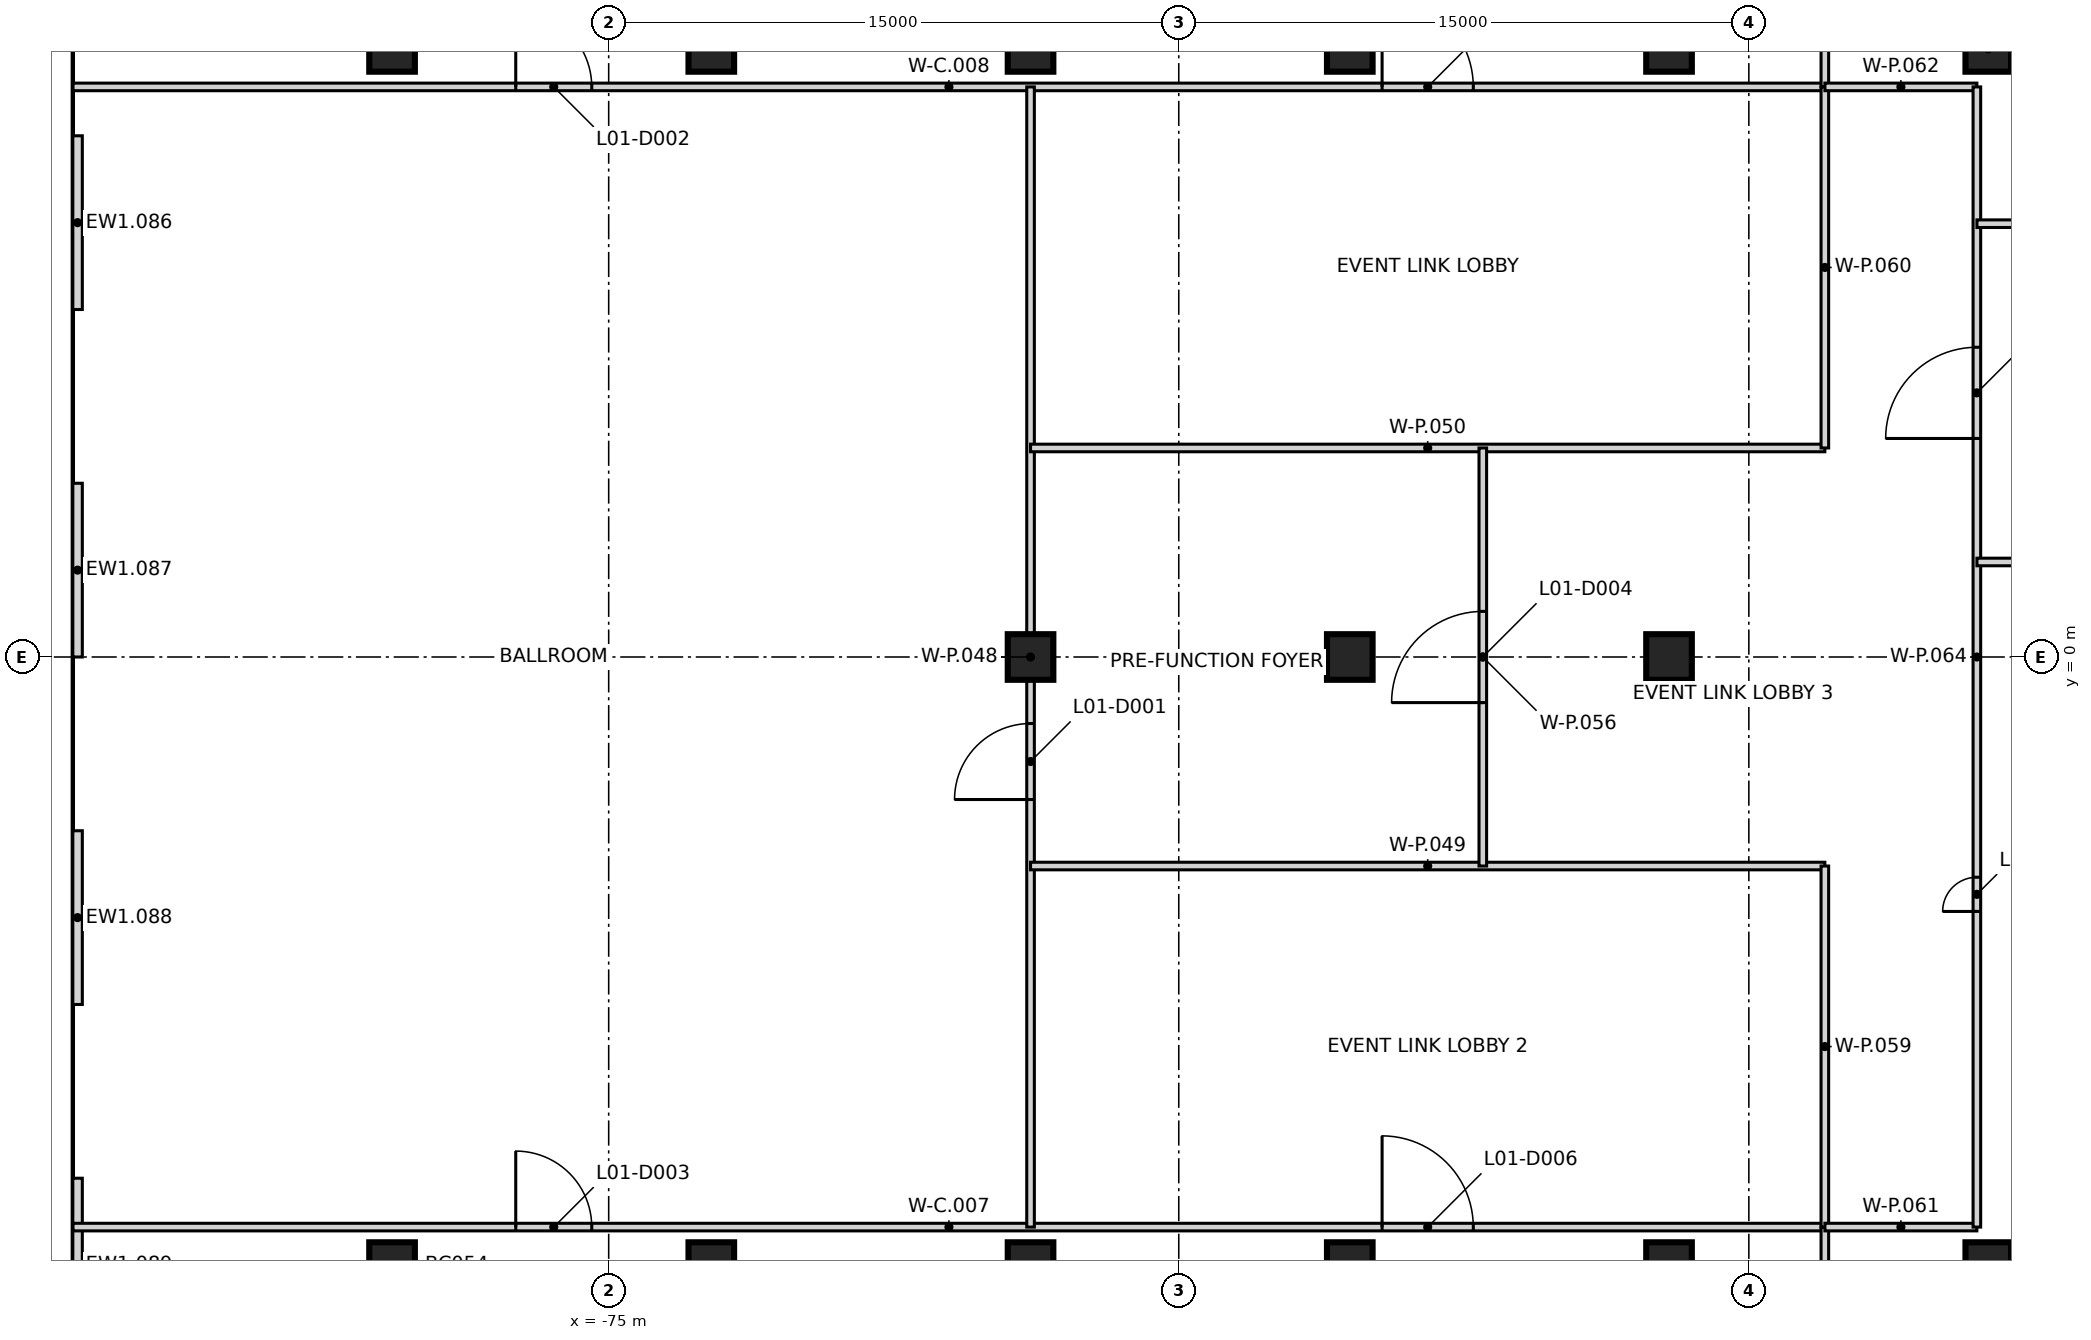
"""IFC4 building model, lengths in metres.
Left out: names, types, materials, properties, quantities, classifications, styles, units other than length and angle.
Written with IfcOpenShell. Run it as: python <this file> out.ifc"""

import sys

from ifc_helpers import new_model, si_unit, direction, frame, frame_2d, origin, origin_2d, place, context, subcontext, project, spatial, rectangle, extrude, element, fill, save


model = new_model("IFC4")
c1 = context("Model", 3, precision=1e-05, world=origin(), true_north=direction((0.0, 1.0)))
c2 = subcontext(c1, "Body", "Model", "MODEL_VIEW")
j1 = project(units=[si_unit("LENGTHUNIT", "METRE"), si_unit("PLANEANGLEUNIT", "RADIAN")], contexts=[c1])
p1 = place(None, origin())
s1 = spatial("IfcSite", under=j1, at=p1, CompositionType="ELEMENT")
p2 = place(p1, origin())
s2 = spatial("IfcBuilding", under=s1, at=p2, CompositionType="ELEMENT")
p3 = place(p2, frame((0.0, 0.0, 7.5)))
s3 = spatial("IfcBuildingStorey", under=s2, at=p3, CompositionType="ELEMENT", Elevation=7.5)
for number, where, z_axis, x_axis in (
    (1, (-80.7, -16.0, -0.4), (0.0, 0.0, 1.0), (1.0, 0.0, 0.0)),
    (2, (-80.7, 16.0, -0.4), (0.0, 0.0, 1.0), (1.0, 0.0, 0.0)),
    (3, (-72.3, -16.0, -0.4), (0.0, 0.0, 1.0), (1.0, 0.0, 0.0)),
    (4, (-72.3, 16.0, -0.4), (0.0, 0.0, 1.0), (1.0, 0.0, 0.0)),
    (5, (-63.9, -16.0, -0.4), (0.0, 0.0, 1.0), (1.0, 0.0, 0.0)),
    (6, (-63.9, 0.0, -0.4), (0.0, 0.0, 1.0), (1.0, 0.0, 0.0)),
    (7, (-63.9, 16.0, -0.4), (0.0, 0.0, 1.0), (1.0, 0.0, 0.0)),
    (8, (-55.5, -16.0, -0.4), (0.0, 0.0, 1.0), (1.0, 0.0, 0.0)),
    (9, (-55.5, 0.0, -0.4), (0.0, 0.0, 1.0), (1.0, 0.0, 0.0)),
    (10, (-55.5, 16.0, -0.4), (0.0, 0.0, 1.0), (1.0, 0.0, 0.0)),
    (11, (-47.1, -16.0, -0.4), (0.0, 0.0, 1.0), (1.0, 0.0, 0.0)),
    (12, (-47.1, 0.0, -0.4), (0.0, 0.0, 1.0), (1.0, 0.0, 0.0)),
    (13, (-47.1, 16.0, -0.4), (0.0, 0.0, 1.0), (1.0, 0.0, 0.0)),
    (14, (-38.7, -16.0, -0.4), (0.0, 0.0, 1.0), (1.0, 0.0, 0.0)),
    (15, (-38.7, 16.0, -0.4), (0.0, 0.0, 1.0), (1.0, 0.0, 0.0)),
):
    element("IfcColumn", number, at=place(p3, frame(where, z_axis=z_axis, x_axis=x_axis)), inside=s3, PredefinedType="COLUMN", context=c2, shape_type="SweptSolid", body=[
        extrude(rectangle(XDim=1.2, YDim=1.2, at=origin_2d()), origin(), (0.0, 0.0, 1.0), 6.55),
    ])
for number, where, z_axis, x_axis in (
    (16, (-88.975, 9.143, 0.0), (0.0, 0.0, 1.0), (0.0, 1.0, 0.0)),
    (17, (-88.975, 0.0, 0.0), (0.0, 0.0, 1.0), (0.0, 1.0, 0.0)),
):
    element("IfcWall", number, at=place(p3, frame(where, z_axis=z_axis, x_axis=x_axis)), inside=s3, PredefinedType="SOLIDWALL", context=c2, shape_type="SweptSolid", body=[
        extrude(rectangle(XDim=4.572, YDim=0.25, at=frame_2d((2.286, 0.0))), origin(), (0.0, 0.0, 1.0), 6.15),
    ])
for number, where, z_axis, x_axis in (
    (18, (-88.975, -9.143, 0.0), (0.0, 0.0, 1.0), (0.0, 1.0, 0.0)),
    (19, (-88.975, -18.286, 0.0), (0.0, 0.0, 1.0), (0.0, 1.0, 0.0)),
):
    element("IfcWall", number, at=place(p3, frame(where, z_axis=z_axis, x_axis=x_axis)), inside=s3, PredefinedType="SOLIDWALL", context=c2, shape_type="SweptSolid", body=[
        extrude(rectangle(XDim=4.571, YDim=0.25, at=frame_2d((2.286, 0.0))), origin(), (0.0, 0.0, 1.0), 6.15),
    ])
p4 = place(p3, frame((-89.095, -15.0, 0.0), z_axis=(0.0, 0.0, 1.0), x_axis=(1.0, 0.0, 0.0)))
e20 = element("IfcWall", 20, at=p4, inside=s3, PredefinedType="PARTITIONING", context=c2, shape_type="SweptSolid", body=[
    extrude(rectangle(XDim=46.095, YDim=0.2, at=frame_2d((23.047, 0.0))), origin(), (0.0, 0.0, 1.0), 6.15),
])
p5 = place(p4, frame((11.649, 0.0, 0.0)))
e21 = element("IfcOpeningElement", 21, at=p5, cuts=e20, PredefinedType="OPENING", context=c2, shape_type="SweptSolid", body=[
    extrude(rectangle(XDim=2.0, YDim=2.1, at=frame_2d((1.0, 1.05))), frame((0.0, 0.11, 0.0), z_axis=(0.0, -1.0, 0.0), x_axis=(1.0, 0.0, 0.0)), (0.0, 0.0, 1.0), 0.22),
])
p6 = place(p4, frame((34.445, 0.0, 0.0)))
e22 = element("IfcOpeningElement", 22, at=p6, cuts=e20, PredefinedType="OPENING", context=c2, shape_type="SweptSolid", body=[
    extrude(rectangle(XDim=2.4, YDim=2.1, at=frame_2d((1.2, 1.05))), frame((0.0, 0.11, 0.0), z_axis=(0.0, -1.0, 0.0), x_axis=(1.0, 0.0, 0.0)), (0.0, 0.0, 1.0), 0.22),
])
p7 = place(p3, frame((-89.095, 15.0, 0.0), z_axis=(0.0, 0.0, 1.0), x_axis=(1.0, 0.0, 0.0)))
e23 = element("IfcWall", 23, at=p7, inside=s3, PredefinedType="PARTITIONING", context=c2, shape_type="SweptSolid", body=[
    extrude(rectangle(XDim=46.095, YDim=0.2, at=frame_2d((23.047, 0.0))), origin(), (0.0, 0.0, 1.0), 6.15),
])
p8 = place(p7, frame((11.649, 0.0, 0.0)))
e24 = element("IfcOpeningElement", 24, at=p8, cuts=e23, PredefinedType="OPENING", context=c2, shape_type="SweptSolid", body=[
    extrude(rectangle(XDim=2.0, YDim=2.1, at=frame_2d((1.0, 1.05))), frame((0.0, 0.11, 0.0), z_axis=(0.0, -1.0, 0.0), x_axis=(1.0, 0.0, 0.0)), (0.0, 0.0, 1.0), 0.22),
])
p9 = place(p7, frame((34.445, 0.0, 0.0)))
e25 = element("IfcOpeningElement", 25, at=p9, cuts=e23, PredefinedType="OPENING", context=c2, shape_type="SweptSolid", body=[
    extrude(rectangle(XDim=2.4, YDim=2.1, at=frame_2d((1.2, 1.05))), frame((0.0, 0.11, 0.0), z_axis=(0.0, -1.0, 0.0), x_axis=(1.0, 0.0, 0.0)), (0.0, 0.0, 1.0), 0.22),
])
for number, where, z_axis, x_axis in (
    (26, (-43.0, -19.5, 0.0), (0.0, 0.0, 1.0), (0.0, 1.0, 0.0)),
    (27, (-43.0, 15.002, 0.0), (0.0, 0.0, 1.0), (0.0, 1.0, 0.0)),
):
    element("IfcWall", number, at=place(p3, frame(where, z_axis=z_axis, x_axis=x_axis)), inside=s3, PredefinedType="PARTITIONING", context=c2, shape_type="SweptSolid", body=[
        extrude(rectangle(XDim=4.498, YDim=0.2, at=frame_2d((2.249, 0.0))), origin(), (0.0, 0.0, 1.0), 6.15),
    ])
p10 = place(p3, frame((-63.9, -15.0, 0.0), z_axis=(0.0, 0.0, 1.0), x_axis=(0.0, 1.0, 0.0)))
e28 = element("IfcWall", 28, at=p10, inside=s3, PredefinedType="PARTITIONING", context=c2, shape_type="SweptSolid", body=[
    extrude(rectangle(XDim=30.0, YDim=0.2, at=frame_2d((15.0, 0.0))), origin(), (0.0, 0.0, 1.0), 6.15),
])
p11 = place(p10, frame((11.25, 0.0, 0.0)))
e29 = element("IfcOpeningElement", 29, at=p11, cuts=e28, PredefinedType="OPENING", context=c2, shape_type="SweptSolid", body=[
    extrude(rectangle(XDim=2.0, YDim=2.1, at=frame_2d((1.0, 1.05))), frame((0.0, 0.11, 0.0), z_axis=(0.0, -1.0, 0.0), x_axis=(1.0, 0.0, 0.0)), (0.0, 0.0, 1.0), 0.22),
])
for number, where, z_axis, x_axis in (
    (30, (-63.9, -5.5, 0.0), (0.0, 0.0, 1.0), (1.0, 0.0, 0.0)),
    (31, (-63.9, 5.5, 0.0), (0.0, 0.0, 1.0), (1.0, 0.0, 0.0)),
):
    element("IfcWall", number, at=place(p3, frame(where, z_axis=z_axis, x_axis=x_axis)), inside=s3, PredefinedType="PARTITIONING", context=c2, shape_type="SweptSolid", body=[
        extrude(rectangle(XDim=20.9, YDim=0.2, at=frame_2d((10.45, 0.0))), origin(), (0.0, 0.0, 1.0), 6.15),
    ])
p12 = place(p3, frame((-52.0, -5.5, 0.0), z_axis=(0.0, 0.0, 1.0), x_axis=(0.0, 1.0, 0.0)))
e32 = element("IfcWall", 32, at=p12, inside=s3, PredefinedType="PARTITIONING", context=c2, shape_type="SweptSolid", body=[
    extrude(rectangle(XDim=11.0, YDim=0.2, at=frame_2d((5.5, 0.0))), origin(), (0.0, 0.0, 1.0), 6.15),
])
p13 = place(p12, frame((4.3, 0.0, 0.0)))
e33 = element("IfcOpeningElement", 33, at=p13, cuts=e32, PredefinedType="OPENING", context=c2, shape_type="SweptSolid", body=[
    extrude(rectangle(XDim=2.4, YDim=2.1, at=frame_2d((1.2, 1.05))), frame((0.0, 0.11, 0.0), z_axis=(0.0, -1.0, 0.0), x_axis=(1.0, 0.0, 0.0)), (0.0, 0.0, 1.0), 0.22),
])
for number, where, z_axis, x_axis in (
    (34, (-43.0, -15.0, 0.0), (0.0, 0.0, 1.0), (0.0, 1.0, 0.0)),
    (35, (-43.0, 5.5, 0.0), (0.0, 0.0, 1.0), (0.0, 1.0, 0.0)),
):
    element("IfcWall", number, at=place(p3, frame(where, z_axis=z_axis, x_axis=x_axis)), inside=s3, PredefinedType="PARTITIONING", context=c2, shape_type="SweptSolid", body=[
        extrude(rectangle(XDim=9.5, YDim=0.2, at=frame_2d((4.75, 0.0))), origin(), (0.0, 0.0, 1.0), 6.15),
    ])
for number, where, z_axis, x_axis in (
    (36, (-42.998, -15.0, 0.0), (0.0, 0.0, 1.0), (1.0, 0.0, 0.0)),
    (37, (-42.998, 15.0, 0.0), (0.0, 0.0, 1.0), (1.0, 0.0, 0.0)),
):
    element("IfcWall", number, at=place(p3, frame(where, z_axis=z_axis, x_axis=x_axis)), inside=s3, PredefinedType="PARTITIONING", context=c2, shape_type="SweptSolid", body=[
        extrude(rectangle(XDim=3.998, YDim=0.2, at=frame_2d((1.999, 0.0))), origin(), (0.0, 0.0, 1.0), 6.15),
    ])
p14 = place(p3, frame((-39.0, -15.0, 0.0), z_axis=(0.0, 0.0, 1.0), x_axis=(0.0, 1.0, 0.0)))
e38 = element("IfcWall", 38, at=p14, inside=s3, PredefinedType="PARTITIONING", context=c2, shape_type="SweptSolid", body=[
    extrude(rectangle(XDim=30.0, YDim=0.2, at=frame_2d((15.0, 0.0))), origin(), (0.0, 0.0, 1.0), 6.15),
])
p15 = place(p14, frame((20.75, 0.0, 0.0)))
e39 = element("IfcOpeningElement", 39, at=p15, cuts=e38, PredefinedType="OPENING", context=c2, shape_type="SweptSolid", body=[
    extrude(rectangle(XDim=2.4, YDim=2.1, at=frame_2d((1.2, 1.05))), frame((0.0, 0.11, 0.0), z_axis=(0.0, -1.0, 0.0), x_axis=(1.0, 0.0, 0.0)), (0.0, 0.0, 1.0), 0.22),
])
p16 = place(p14, frame((8.305, 0.0, 0.0)))
e40 = element("IfcOpeningElement", 40, at=p16, cuts=e38, PredefinedType="OPENING", context=c2, shape_type="SweptSolid", body=[
    extrude(rectangle(XDim=0.9, YDim=2.1, at=frame_2d((0.45, 1.05))), frame((0.0, 0.11, 0.0), z_axis=(0.0, -1.0, 0.0), x_axis=(1.0, 0.0, 0.0)), (0.0, 0.0, 1.0), 0.22),
])
p17 = place(p3, frame((-38.998, 2.5, 0.0), z_axis=(0.0, 0.0, 1.0), x_axis=(1.0, 0.0, 0.0)))
e41 = element("IfcWall", 41, at=p17, inside=s3, PredefinedType="PARTITIONING", context=c2, shape_type="SweptSolid", body=[
    extrude(rectangle(XDim=13.298, YDim=0.2, at=frame_2d((6.649, 0.0))), origin(), (0.0, 0.0, 1.0), 6.15),
])
p18 = place(p3, frame((-38.998, 11.401, 0.0), z_axis=(0.0, 0.0, 1.0), x_axis=(1.0, 0.0, 0.0)))
e42 = element("IfcWall", 42, at=p18, inside=s3, PredefinedType="PARTITIONING", context=c2, shape_type="SweptSolid", body=[
    extrude(rectangle(XDim=29.998, YDim=0.2, at=frame_2d((14.999, 0.0))), origin(), (0.0, 0.0, 1.0), 3.75),
])
p19 = place(p18, frame((12.142, 0.0, 0.0)))
e43 = element("IfcOpeningElement", 43, at=p19, cuts=e42, PredefinedType="OPENING", context=c2, shape_type="SweptSolid", body=[
    extrude(rectangle(XDim=0.8, YDim=2.1, at=frame_2d((0.4, 1.05))), frame((0.0, 0.11, 0.0), z_axis=(0.0, -1.0, 0.0), x_axis=(1.0, 0.0, 0.0)), (0.0, 0.0, 1.0), 0.22),
])
p20 = place(p11, origin())
e44 = element("IfcDoor", 44, at=p20, inside=s3, OperationType="DOUBLE_DOOR_SINGLE_SWING", PredefinedType="DOOR", context=c2, shape_type="SweptSolid", body=[
    extrude(rectangle(XDim=2.0, YDim=2.1, at=frame_2d((1.0, 1.05))), frame((0.0, 0.025, 0.0), z_axis=(0.0, -1.0, 0.0), x_axis=(1.0, 0.0, 0.0)), (0.0, 0.0, 1.0), 0.05),
])
fill(e29, e44)
p21 = place(p8, frame((2.0, 0.0, 0.0), z_axis=(0.0, 0.0, 1.0), x_axis=(-1.0, 0.0, 0.0)))
e45 = element("IfcDoor", 45, at=p21, inside=s3, OperationType="DOUBLE_DOOR_SINGLE_SWING", PredefinedType="DOOR", context=c2, shape_type="SweptSolid", body=[
    extrude(rectangle(XDim=2.0, YDim=2.1, at=frame_2d((1.0, 1.05))), frame((0.0, 0.025, 0.0), z_axis=(0.0, -1.0, 0.0), x_axis=(1.0, 0.0, 0.0)), (0.0, 0.0, 1.0), 0.05),
])
fill(e24, e45)
p22 = place(p5, origin())
e46 = element("IfcDoor", 46, at=p22, inside=s3, OperationType="DOUBLE_DOOR_SINGLE_SWING", PredefinedType="DOOR", context=c2, shape_type="SweptSolid", body=[
    extrude(rectangle(XDim=2.0, YDim=2.1, at=frame_2d((1.0, 1.05))), frame((0.0, 0.025, 0.0), z_axis=(0.0, -1.0, 0.0), x_axis=(1.0, 0.0, 0.0)), (0.0, 0.0, 1.0), 0.05),
])
fill(e21, e46)
p23 = place(p13, origin())
e47 = element("IfcDoor", 47, at=p23, inside=s3, OperationType="DOUBLE_DOOR_SINGLE_SWING", PredefinedType="DOOR", context=c2, shape_type="SweptSolid", body=[
    extrude(rectangle(XDim=2.4, YDim=2.1, at=frame_2d((1.2, 1.05))), frame((0.0, 0.025, 0.0), z_axis=(0.0, -1.0, 0.0), x_axis=(1.0, 0.0, 0.0)), (0.0, 0.0, 1.0), 0.05),
])
fill(e33, e47)
p24 = place(p9, frame((2.4, 0.0, 0.0), z_axis=(0.0, 0.0, 1.0), x_axis=(-1.0, 0.0, 0.0)))
e48 = element("IfcDoor", 48, at=p24, inside=s3, OperationType="DOUBLE_DOOR_SINGLE_SWING", PredefinedType="DOOR", context=c2, shape_type="SweptSolid", body=[
    extrude(rectangle(XDim=2.4, YDim=2.1, at=frame_2d((1.2, 1.05))), frame((0.0, 0.025, 0.0), z_axis=(0.0, -1.0, 0.0), x_axis=(1.0, 0.0, 0.0)), (0.0, 0.0, 1.0), 0.05),
])
fill(e25, e48)
p25 = place(p6, origin())
e49 = element("IfcDoor", 49, at=p25, inside=s3, OperationType="DOUBLE_DOOR_SINGLE_SWING", PredefinedType="DOOR", context=c2, shape_type="SweptSolid", body=[
    extrude(rectangle(XDim=2.4, YDim=2.1, at=frame_2d((1.2, 1.05))), frame((0.0, 0.025, 0.0), z_axis=(0.0, -1.0, 0.0), x_axis=(1.0, 0.0, 0.0)), (0.0, 0.0, 1.0), 0.05),
])
fill(e22, e49)
p26 = place(p15, frame((2.4, 0.0, 0.0), z_axis=(0.0, 0.0, 1.0), x_axis=(-1.0, 0.0, 0.0)))
e50 = element("IfcDoor", 50, at=p26, inside=s3, OperationType="DOUBLE_DOOR_SINGLE_SWING", PredefinedType="DOOR", context=c2, shape_type="SweptSolid", body=[
    extrude(rectangle(XDim=2.4, YDim=2.1, at=frame_2d((1.2, 1.05))), frame((0.0, 0.025, 0.0), z_axis=(0.0, -1.0, 0.0), x_axis=(1.0, 0.0, 0.0)), (0.0, 0.0, 1.0), 0.05),
])
fill(e39, e50)
p27 = place(p16, frame((0.9, 0.0, 0.0), z_axis=(0.0, 0.0, 1.0), x_axis=(-1.0, 0.0, 0.0)))
e51 = element("IfcDoor", 51, at=p27, inside=s3, OperationType="SINGLE_SWING_LEFT", PredefinedType="DOOR", context=c2, shape_type="SweptSolid", body=[
    extrude(rectangle(XDim=0.9, YDim=2.1, at=frame_2d((0.45, 1.05))), frame((0.0, 0.025, 0.0), z_axis=(0.0, -1.0, 0.0), x_axis=(1.0, 0.0, 0.0)), (0.0, 0.0, 1.0), 0.05),
])
fill(e40, e51)
save(model, sys.argv[1])
